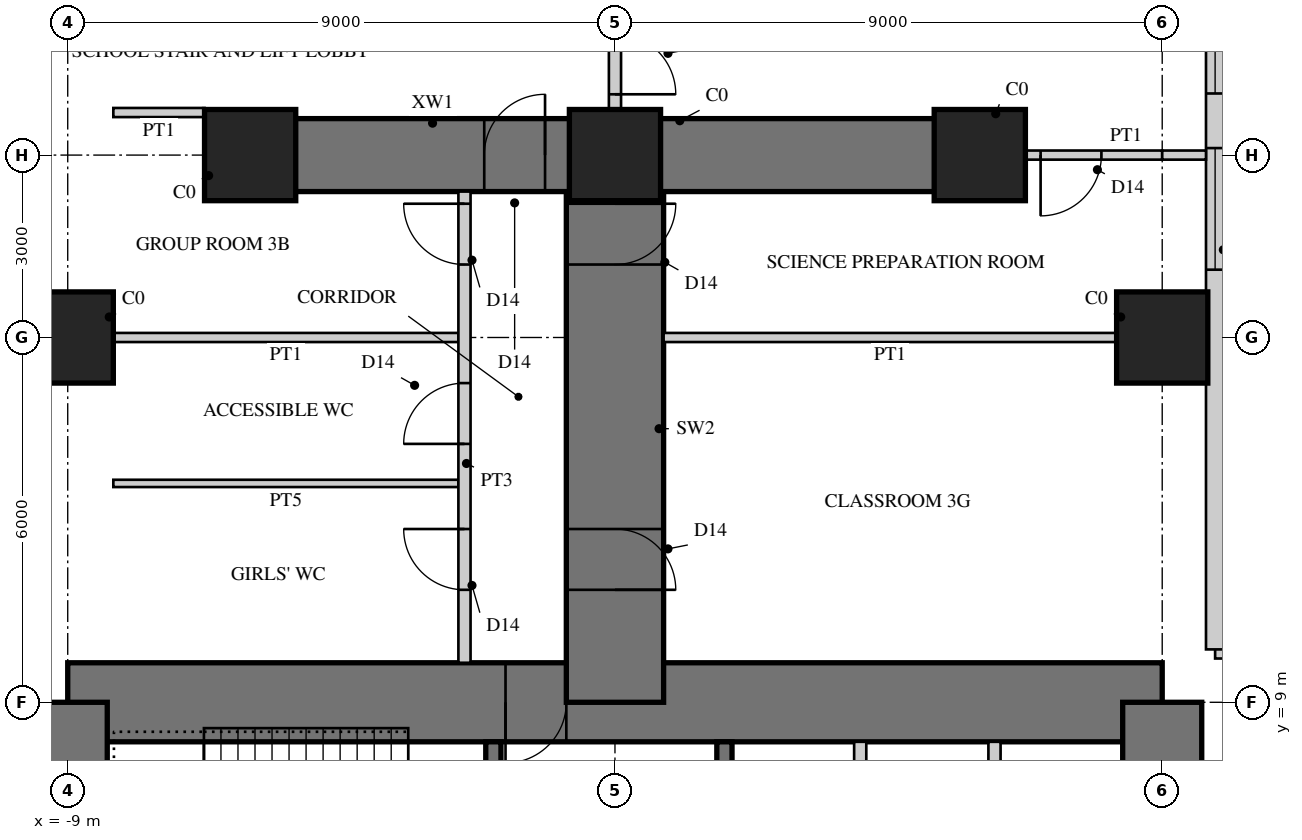
"""IFC4 building model, lengths in metres.
Left out: names, types, materials, properties, quantities, classifications, styles, units other than length and angle.
Written with IfcOpenShell. Run it as: python <this file> out.ifc"""

import sys

from ifc_helpers import new_model, si_unit, direction, frame, frame_2d, origin, origin_2d, place, context, subcontext, project, spatial, rectangle, hollow_rectangle, extrude, element, fill, save


model = new_model("IFC4")
c1 = context("Model", 3, precision=1e-05, world=origin(), true_north=direction((0.0, 1.0)))
c2 = subcontext(c1, "Body", "Model", "MODEL_VIEW")
j1 = project(units=[si_unit("LENGTHUNIT", "METRE"), si_unit("PLANEANGLEUNIT", "RADIAN")], contexts=[c1])
p1 = place(None, origin())
s1 = spatial("IfcSite", under=j1, at=p1, CompositionType="ELEMENT")
p2 = place(p1, origin())
s2 = spatial("IfcBuilding", under=s1, at=p2, CompositionType="ELEMENT")
p3 = place(p2, frame((0.0, 0.0, 14.0)))
s3 = spatial("IfcBuildingStorey", under=s2, at=p3, CompositionType="ELEMENT", Elevation=14.0)
p4 = place(p3, frame((9.0, 9.0, 0.0), z_axis=(0.0, 0.0, 1.0), x_axis=(-1.0, 0.0, 0.0)))
e1 = element("IfcWall", 1, at=p4, inside=s3, PredefinedType="SHEAR", context=c2, shape_type="SweptSolid", body=[
    extrude(rectangle(XDim=18.0, YDim=1.3, at=frame_2d((9.0, 0.0))), origin(), (0.0, 0.0, 1.0), 4.5),
])
p5 = place(p4, frame((9.8, 0.0, 0.0)))
e2 = element("IfcOpeningElement", 2, at=p5, cuts=e1, PredefinedType="OPENING", context=c2, shape_type="SweptSolid", body=[
    extrude(rectangle(XDim=1.0, YDim=2.4, at=frame_2d((0.5, 1.2))), frame((0.0, 0.66, 0.0), z_axis=(0.0, -1.0, 0.0), x_axis=(1.0, 0.0, 0.0)), (0.0, 0.0, 1.0), 1.32),
])
p6 = place(p3, frame((9.0, -9.0, 0.0), z_axis=(0.0, 0.0, 1.0), x_axis=(0.0, 1.0, 0.0)))
e3 = element("IfcWall", 3, at=p6, inside=s3, PredefinedType="SHEAR", context=c2, shape_type="SweptSolid", body=[
    extrude(rectangle(XDim=18.0, YDim=1.3, at=frame_2d((9.0, 0.0))), origin(), (0.0, 0.0, 1.0), 4.5),
])
p7 = place(p6, frame((9.8, 0.0, 0.0)))
e4 = element("IfcOpeningElement", 4, at=p7, cuts=e3, PredefinedType="OPENING", context=c2, shape_type="SweptSolid", body=[
    extrude(rectangle(XDim=1.0, YDim=2.4, at=frame_2d((0.5, 1.2))), frame((0.0, 0.66, 0.0), z_axis=(0.0, -1.0, 0.0), x_axis=(1.0, 0.0, 0.0)), (0.0, 0.0, 1.0), 1.32),
])
p8 = place(p3, frame((-9.0, 9.0, 0.0), z_axis=(0.0, 0.0, 1.0), x_axis=(0.0, -1.0, 0.0)))
e5 = element("IfcWall", 5, at=p8, inside=s3, PredefinedType="SHEAR", context=c2, shape_type="SweptSolid", body=[
    extrude(rectangle(XDim=18.0, YDim=1.3, at=frame_2d((9.0, 0.0))), origin(), (0.0, 0.0, 1.0), 4.5),
])
p9 = place(p8, frame((9.8, 0.0, 0.0)))
e6 = element("IfcOpeningElement", 6, at=p9, cuts=e5, PredefinedType="OPENING", context=c2, shape_type="SweptSolid", body=[
    extrude(rectangle(XDim=1.0, YDim=2.4, at=frame_2d((0.5, 1.2))), frame((0.0, 0.66, 0.0), z_axis=(0.0, -1.0, 0.0), x_axis=(1.0, 0.0, 0.0)), (0.0, 0.0, 1.0), 1.32),
])
p10 = place(p3, frame((1.8, 1.875, 0.0), z_axis=(0.0, 0.0, 1.0), x_axis=(0.0, 1.0, 0.0)))
e7 = element("IfcWall", 7, at=p10, inside=s3, PredefinedType="SHEAR", context=c2, shape_type="SweptSolid", body=[
    extrude(rectangle(XDim=6.475, YDim=0.25, at=frame_2d((3.238, 0.0))), origin(), (0.0, 0.0, 1.0), 4.5),
])
p11 = place(p10, frame((1.875, 0.0, 0.0)))
e8 = element("IfcOpeningElement", 8, at=p11, cuts=e7, PredefinedType="OPENING", context=c2, shape_type="SweptSolid", body=[
    extrude(rectangle(XDim=1.6, YDim=2.4, at=frame_2d((0.8, 1.2))), frame((0.0, 0.135, 0.0), z_axis=(0.0, -1.0, 0.0), x_axis=(1.0, 0.0, 0.0)), (0.0, 0.0, 1.0), 0.27),
])
for number, where, z_axis, x_axis in (
    (9, (4.033, 5.975, 0.0), (0.0, 0.0, 1.0), (0.0, 1.0, 0.0)),
    (10, (6.242, 5.975, 0.0), (0.0, 0.0, 1.0), (0.0, 1.0, 0.0)),
):
    element("IfcWall", number, at=place(p3, frame(where, z_axis=z_axis, x_axis=x_axis)), inside=s3, PredefinedType="PARTITIONING", context=c2, shape_type="SweptSolid", body=[
        extrude(rectangle(XDim=2.375, YDim=0.2, at=frame_2d((1.188, 0.0))), origin(), (0.0, 0.0, 1.0), 4.5),
    ])
p12 = place(p3, frame((-2.0, 1.675, 0.0), z_axis=(0.0, 0.0, 1.0), x_axis=(0.0, 1.0, 0.0)))
e11 = element("IfcWall", 11, at=p12, inside=s3, PredefinedType="SHEAR", context=c2, shape_type="SweptSolid", body=[
    extrude(rectangle(XDim=6.675, YDim=0.25, at=frame_2d((3.337, 0.0))), origin(), (0.0, 0.0, 1.0), 4.5),
])
p13 = place(p12, frame((0.725, 0.0, 0.0)))
e12 = element("IfcOpeningElement", 12, at=p13, cuts=e11, PredefinedType="OPENING", context=c2, shape_type="SweptSolid", body=[
    extrude(rectangle(XDim=1.0, YDim=2.1, at=frame_2d((0.5, 1.05))), frame((0.0, 0.135, 0.0), z_axis=(0.0, -1.0, 0.0), x_axis=(1.0, 0.0, 0.0)), (0.0, 0.0, 1.0), 0.27),
])
p14 = place(p3, frame((0.0, 9.0, 0.0), z_axis=(0.0, 0.0, 1.0), x_axis=(0.0, 1.0, 0.0)))
e13 = element("IfcWall", 13, at=p14, inside=s3, PredefinedType="SHEAR", context=c2, shape_type="SweptSolid", body=[
    extrude(rectangle(XDim=9.0, YDim=1.6, at=frame_2d((4.5, 0.0))), origin(), (0.0, 0.0, 1.0), 4.5),
])
p15 = place(p14, frame((1.85, 0.0, 0.0)))
e14 = element("IfcOpeningElement", 14, at=p15, cuts=e13, PredefinedType="OPENING", context=c2, shape_type="SweptSolid", body=[
    extrude(rectangle(XDim=1.0, YDim=2.2, at=frame_2d((0.5, 1.1))), frame((0.0, 0.81, 0.0), z_axis=(0.0, -1.0, 0.0), x_axis=(1.0, 0.0, 0.0)), (0.0, 0.0, 1.0), 1.62),
])
p16 = place(p14, frame((7.2, 0.0, 0.0)))
e15 = element("IfcOpeningElement", 15, at=p16, cuts=e13, PredefinedType="OPENING", context=c2, shape_type="SweptSolid", body=[
    extrude(rectangle(XDim=1.0, YDim=2.2, at=frame_2d((0.5, 1.1))), frame((0.0, 0.81, 0.0), z_axis=(0.0, -1.0, 0.0), x_axis=(1.0, 0.0, 0.0)), (0.0, 0.0, 1.0), 1.62),
])
p17 = place(p3, frame((0.0, 18.0, 0.0), z_axis=(0.0, 0.0, 1.0), x_axis=(-1.0, 0.0, 0.0)))
e16 = element("IfcWall", 16, at=p17, inside=s3, PredefinedType="SHEAR", context=c2, shape_type="SweptSolid", body=[
    extrude(rectangle(XDim=6.0, YDim=1.2, at=frame_2d((3.0, 0.0))), origin(), (0.0, 0.0, 1.0), 4.5),
])
p18 = place(p17, frame((1.15, 0.0, 0.0)))
e17 = element("IfcOpeningElement", 17, at=p18, cuts=e16, PredefinedType="OPENING", context=c2, shape_type="SweptSolid", body=[
    extrude(rectangle(XDim=1.0, YDim=2.2, at=frame_2d((0.5, 1.1))), frame((0.0, 0.61, 0.0), z_axis=(0.0, -1.0, 0.0), x_axis=(1.0, 0.0, 0.0)), (0.0, 0.0, 1.0), 1.22),
])
p19 = place(p3, frame((0.0, 18.0, 0.0), z_axis=(0.0, 0.0, 1.0), x_axis=(1.0, 0.0, 0.0)))
e18 = element("IfcWall", 18, at=p19, inside=s3, PredefinedType="SHEAR", context=c2, shape_type="SweptSolid", body=[
    extrude(rectangle(XDim=6.0, YDim=1.2, at=frame_2d((3.0, 0.0))), origin(), (0.0, 0.0, 1.0), 4.5),
])
for number, where, z_axis, x_axis in (
    (19, (9.0, 15.0, 0.0), (0.0, 0.0, 1.0), (1.0, 0.0, 0.0)),
    (20, (-9.0, 15.0, 0.0), (0.0, 0.0, 1.0), (1.0, 0.0, 0.0)),
    (21, (6.0, 18.0, 0.0), (0.0, 0.0, 1.0), (1.0, 0.0, 0.0)),
    (22, (0.0, 18.0, 0.0), (0.0, 0.0, 1.0), (1.0, 0.0, 0.0)),
    (23, (-6.0, 18.0, 0.0), (0.0, 0.0, 1.0), (1.0, 0.0, 0.0)),
):
    element("IfcColumn", number, at=place(p3, frame(where, z_axis=z_axis, x_axis=x_axis)), inside=s3, PredefinedType="COLUMN", context=c2, shape_type="SweptSolid", body=[
        extrude(rectangle(XDim=1.5, YDim=1.5, at=origin_2d()), origin(), (0.0, 0.0, 1.0), 4.5),
    ])
p20 = place(p3, frame((24.36, 9.87, 0.0), z_axis=(0.0, 0.0, 1.0), x_axis=(-1.0, 0.0, 0.0)))
e24 = element("IfcWall", 24, at=p20, inside=s3, PredefinedType="SOLIDWALL", context=c2, shape_type="SweptSolid", body=[
    extrude(rectangle(XDim=14.49, YDim=0.3, at=frame_2d((7.245, 0.0))), origin(), (0.0, 0.0, 1.0), 4.25),
])
p21 = place(p20, frame((3.347, 0.0, 0.9)))
e25 = element("IfcOpeningElement", 25, at=p21, cuts=e24, PredefinedType="OPENING", context=c2, shape_type="SweptSolid", body=[
    extrude(rectangle(XDim=2.0, YDim=1.8, at=frame_2d((1.0, 0.9))), frame((0.0, 0.16, 0.0), z_axis=(0.0, -1.0, 0.0), x_axis=(1.0, 0.0, 0.0)), (0.0, 0.0, 1.0), 0.32),
])
p22 = place(p3, frame((9.87, 9.87, 0.0), z_axis=(0.0, 0.0, 1.0), x_axis=(0.0, 1.0, 0.0)))
e26 = element("IfcWall", 26, at=p22, inside=s3, PredefinedType="SOLIDWALL", context=c2, shape_type="SweptSolid", body=[
    extrude(rectangle(XDim=14.49, YDim=0.3, at=frame_2d((7.245, 0.0))), origin(), (0.0, 0.0, 1.0), 4.25),
])
p23 = place(p22, frame((6.245, 0.0, 0.9)))
e27 = element("IfcOpeningElement", 27, at=p23, cuts=e26, PredefinedType="OPENING", context=c2, shape_type="SweptSolid", body=[
    extrude(rectangle(XDim=2.0, YDim=1.8, at=frame_2d((1.0, 0.9))), frame((0.0, 0.16, 0.0), z_axis=(0.0, -1.0, 0.0), x_axis=(1.0, 0.0, 0.0)), (0.0, 0.0, 1.0), 0.32),
])
p24 = place(p22, frame((9.143, 0.0, 0.9)))
e28 = element("IfcOpeningElement", 28, at=p24, cuts=e26, PredefinedType="OPENING", context=c2, shape_type="SweptSolid", body=[
    extrude(rectangle(XDim=2.0, YDim=1.8, at=frame_2d((1.0, 0.9))), frame((0.0, 0.16, 0.0), z_axis=(0.0, -1.0, 0.0), x_axis=(1.0, 0.0, 0.0)), (0.0, 0.0, 1.0), 0.32),
])
p25 = place(p3, frame((-2.575, 15.0, 0.0), z_axis=(0.0, 0.0, 1.0), x_axis=(-1.0, 0.0, 0.0)))
e29 = element("IfcWall", 29, at=p25, inside=s3, PredefinedType="PARTITIONING", context=c2, shape_type="SweptSolid", body=[
    extrude(rectangle(XDim=5.675, YDim=0.15, at=frame_2d((2.837, 0.0))), origin(), (0.0, 0.0, 1.0), 3.2),
])
p26 = place(p3, frame((8.25, 15.0, 0.0), z_axis=(0.0, 0.0, 1.0), x_axis=(-1.0, 0.0, 0.0)))
e30 = element("IfcWall", 30, at=p26, inside=s3, PredefinedType="PARTITIONING", context=c2, shape_type="SweptSolid", body=[
    extrude(rectangle(XDim=7.45, YDim=0.15, at=frame_2d((3.725, 0.0))), origin(), (0.0, 0.0, 1.0), 3.2),
])
p27 = place(p3, frame((-2.575, 12.6, 0.0), z_axis=(0.0, 0.0, 1.0), x_axis=(-1.0, 0.0, 0.0)))
e31 = element("IfcWall", 31, at=p27, inside=s3, PredefinedType="PLUMBINGWALL", context=c2, shape_type="SweptSolid", body=[
    extrude(rectangle(XDim=5.675, YDim=0.12, at=frame_2d((2.837, 0.0))), origin(), (0.0, 0.0, 1.0), 4.25),
])
p28 = place(p3, frame((-2.475, 9.65, 0.0), z_axis=(0.0, 0.0, 1.0), x_axis=(0.0, 1.0, 0.0)))
e32 = element("IfcWall", 32, at=p28, inside=s3, PredefinedType="SOLIDWALL", context=c2, shape_type="SweptSolid", body=[
    extrude(rectangle(XDim=7.75, YDim=0.2, at=frame_2d((3.875, 0.0))), origin(), (0.0, 0.0, 1.0), 4.25),
])
p29 = place(p28, frame((1.2, 0.0, 0.0)))
e33 = element("IfcOpeningElement", 33, at=p29, cuts=e32, PredefinedType="OPENING", context=c2, shape_type="SweptSolid", body=[
    extrude(rectangle(XDim=1.0, YDim=2.2, at=frame_2d((0.5, 1.1))), frame((0.0, 0.11, 0.0), z_axis=(0.0, -1.0, 0.0), x_axis=(1.0, 0.0, 0.0)), (0.0, 0.0, 1.0), 0.22),
])
p30 = place(p28, frame((3.6, 0.0, 0.0)))
e34 = element("IfcOpeningElement", 34, at=p30, cuts=e32, PredefinedType="OPENING", context=c2, shape_type="SweptSolid", body=[
    extrude(rectangle(XDim=1.0, YDim=2.2, at=frame_2d((0.5, 1.1))), frame((0.0, 0.11, 0.0), z_axis=(0.0, -1.0, 0.0), x_axis=(1.0, 0.0, 0.0)), (0.0, 0.0, 1.0), 0.22),
])
p31 = place(p28, frame((6.55, 0.0, 0.0)))
e35 = element("IfcOpeningElement", 35, at=p31, cuts=e32, PredefinedType="OPENING", context=c2, shape_type="SweptSolid", body=[
    extrude(rectangle(XDim=1.0, YDim=2.2, at=frame_2d((0.5, 1.1))), frame((0.0, 0.11, 0.0), z_axis=(0.0, -1.0, 0.0), x_axis=(1.0, 0.0, 0.0)), (0.0, 0.0, 1.0), 0.22),
])
p32 = place(p3, frame((-6.75, 18.7, 0.0), z_axis=(0.0, 0.0, 1.0), x_axis=(-1.0, 0.0, 0.0)))
e36 = element("IfcWall", 36, at=p32, inside=s3, PredefinedType="PARTITIONING", context=c2, shape_type="SweptSolid", body=[
    extrude(rectangle(XDim=1.5, YDim=0.15, at=frame_2d((0.75, 0.0))), origin(), (0.0, 0.0, 1.0), 4.25),
])
p33 = place(p3, frame((6.75, 18.0, 0.0), z_axis=(0.0, 0.0, 1.0), x_axis=(1.0, 0.0, 0.0)))
e37 = element("IfcWall", 37, at=p33, inside=s3, PredefinedType="PARTITIONING", context=c2, shape_type="SweptSolid", body=[
    extrude(rectangle(XDim=2.25, YDim=0.15, at=frame_2d((1.125, 0.0))), origin(), (0.0, 0.0, 1.0), 3.2),
])
p34 = place(p33, frame((0.25, 0.0, 0.0)))
e38 = element("IfcOpeningElement", 38, at=p34, cuts=e37, PredefinedType="OPENING", context=c2, shape_type="SweptSolid", body=[
    extrude(rectangle(XDim=1.0, YDim=2.2, at=frame_2d((0.5, 1.1))), frame((0.0, 0.085, 0.0), z_axis=(0.0, -1.0, 0.0), x_axis=(1.0, 0.0, 0.0)), (0.0, 0.0, 1.0), 0.17),
])
p35 = place(p3, frame((9.0, 18.0, 0.0), z_axis=(0.0, 0.0, 1.0), x_axis=(1.0, 0.0, 0.0)))
e39 = element("IfcWall", 39, at=p35, inside=s3, PredefinedType="PARTITIONING", context=c2, shape_type="SweptSolid", body=[
    extrude(rectangle(XDim=0.72, YDim=0.15, at=frame_2d((0.36, 0.0))), origin(), (0.0, 0.0, 1.0), 4.25),
])
p36 = place(p3, frame((0.0, 18.0, 0.0), z_axis=(0.0, 0.0, 1.0), x_axis=(0.0, 1.0, 0.0)))
e40 = element("IfcWall", 40, at=p36, inside=s3, PredefinedType="SOLIDWALL", context=c2, shape_type="SweptSolid", body=[
    extrude(rectangle(XDim=3.0, YDim=0.2, at=frame_2d((1.5, 0.0))), origin(), (0.0, 0.0, 1.0), 4.25),
])
p37 = place(p36, frame((1.0, 0.0, 0.0)))
e41 = element("IfcOpeningElement", 41, at=p37, cuts=e40, PredefinedType="OPENING", context=c2, shape_type="SweptSolid", body=[
    extrude(rectangle(XDim=1.0, YDim=2.2, at=frame_2d((0.5, 1.1))), frame((0.0, 0.11, 0.0), z_axis=(0.0, -1.0, 0.0), x_axis=(1.0, 0.0, 0.0)), (0.0, 0.0, 1.0), 0.22),
])
p38 = place(p23, origin())
e42 = element("IfcWindow", 42, at=p38, inside=s3, PartitioningType="SINGLE_PANEL", PredefinedType="WINDOW", context=c2, shape_type="SweptSolid", body=[
    extrude(hollow_rectangle(XDim=2.0, YDim=1.8, WallThickness=0.06, at=frame_2d((1.0, 0.9))), frame((0.0, 0.03, 0.0), z_axis=(0.0, -1.0, 0.0), x_axis=(1.0, 0.0, 0.0)), (0.0, 0.0, 1.0), 0.06),
    extrude(rectangle(XDim=1.879, YDim=1.679, at=frame_2d((1.0, 0.9))), frame((0.0, 0.03, 0.0), z_axis=(0.0, -1.0, 0.0), x_axis=(1.0, 0.0, 0.0)), (0.0, 0.0, 1.0), 0.06),
])
fill(e27, e42)
p39 = place(p24, origin())
e43 = element("IfcWindow", 43, at=p39, inside=s3, PartitioningType="SINGLE_PANEL", PredefinedType="WINDOW", context=c2, shape_type="SweptSolid", body=[
    extrude(hollow_rectangle(XDim=2.0, YDim=1.8, WallThickness=0.06, at=frame_2d((1.0, 0.9))), frame((0.0, 0.03, 0.0), z_axis=(0.0, -1.0, 0.0), x_axis=(1.0, 0.0, 0.0)), (0.0, 0.0, 1.0), 0.06),
    extrude(rectangle(XDim=1.879, YDim=1.679, at=frame_2d((1.0, 0.9))), frame((0.0, 0.03, 0.0), z_axis=(0.0, -1.0, 0.0), x_axis=(1.0, 0.0, 0.0)), (0.0, 0.0, 1.0), 0.06),
])
fill(e28, e43)
p40 = place(p29, origin())
e44 = element("IfcDoor", 44, at=p40, inside=s3, OperationType="SINGLE_SWING_RIGHT", PredefinedType="DOOR", context=c2, shape_type="SweptSolid", body=[
    extrude(rectangle(XDim=1.0, YDim=2.2, at=frame_2d((0.5, 1.1))), frame((0.0, 0.025, 0.0), z_axis=(0.0, -1.0, 0.0), x_axis=(1.0, 0.0, 0.0)), (0.0, 0.0, 1.0), 0.05),
])
fill(e33, e44)
p41 = place(p30, origin())
e45 = element("IfcDoor", 45, at=p41, inside=s3, OperationType="SINGLE_SWING_LEFT", PredefinedType="DOOR", context=c2, shape_type="SweptSolid", body=[
    extrude(rectangle(XDim=1.0, YDim=2.2, at=frame_2d((0.5, 1.1))), frame((0.0, 0.025, 0.0), z_axis=(0.0, -1.0, 0.0), x_axis=(1.0, 0.0, 0.0)), (0.0, 0.0, 1.0), 0.05),
])
fill(e34, e45)
p42 = place(p31, origin())
e46 = element("IfcDoor", 46, at=p42, inside=s3, OperationType="SINGLE_SWING_RIGHT", PredefinedType="DOOR", context=c2, shape_type="SweptSolid", body=[
    extrude(rectangle(XDim=1.0, YDim=2.2, at=frame_2d((0.5, 1.1))), frame((0.0, 0.025, 0.0), z_axis=(0.0, -1.0, 0.0), x_axis=(1.0, 0.0, 0.0)), (0.0, 0.0, 1.0), 0.05),
])
fill(e35, e46)
p43 = place(p34, frame((1.0, 0.0, 0.0), z_axis=(0.0, 0.0, 1.0), x_axis=(-1.0, 0.0, 0.0)))
e47 = element("IfcDoor", 47, at=p43, inside=s3, OperationType="SINGLE_SWING_RIGHT", PredefinedType="DOOR", context=c2, shape_type="SweptSolid", body=[
    extrude(rectangle(XDim=1.0, YDim=2.2, at=frame_2d((0.5, 1.1))), frame((0.0, 0.025, 0.0), z_axis=(0.0, -1.0, 0.0), x_axis=(1.0, 0.0, 0.0)), (0.0, 0.0, 1.0), 0.05),
])
fill(e38, e47)
p44 = place(p15, frame((1.0, 0.0, 0.0), z_axis=(0.0, 0.0, 1.0), x_axis=(-1.0, 0.0, 0.0)))
e48 = element("IfcDoor", 48, at=p44, inside=s3, OperationType="SINGLE_SWING_RIGHT", PredefinedType="DOOR", context=c2, shape_type="SweptSolid", body=[
    extrude(rectangle(XDim=1.0, YDim=2.2, at=frame_2d((0.5, 1.1))), frame((0.0, 0.025, 0.0), z_axis=(0.0, -1.0, 0.0), x_axis=(1.0, 0.0, 0.0)), (0.0, 0.0, 1.0), 0.05),
])
fill(e14, e48)
p45 = place(p16, frame((1.0, 0.0, 0.0), z_axis=(0.0, 0.0, 1.0), x_axis=(-1.0, 0.0, 0.0)))
e49 = element("IfcDoor", 49, at=p45, inside=s3, OperationType="SINGLE_SWING_LEFT", PredefinedType="DOOR", context=c2, shape_type="SweptSolid", body=[
    extrude(rectangle(XDim=1.0, YDim=2.2, at=frame_2d((0.5, 1.1))), frame((0.0, 0.025, 0.0), z_axis=(0.0, -1.0, 0.0), x_axis=(1.0, 0.0, 0.0)), (0.0, 0.0, 1.0), 0.05),
])
fill(e15, e49)
p46 = place(p37, frame((1.0, 0.0, 0.0), z_axis=(0.0, 0.0, 1.0), x_axis=(-1.0, 0.0, 0.0)))
e50 = element("IfcDoor", 50, at=p46, inside=s3, OperationType="SINGLE_SWING_RIGHT", PredefinedType="DOOR", context=c2, shape_type="SweptSolid", body=[
    extrude(rectangle(XDim=1.0, YDim=2.2, at=frame_2d((0.5, 1.1))), frame((0.0, 0.025, 0.0), z_axis=(0.0, -1.0, 0.0), x_axis=(1.0, 0.0, 0.0)), (0.0, 0.0, 1.0), 0.05),
])
fill(e41, e50)
p47 = place(p18, frame((1.0, 0.0, 0.0), z_axis=(0.0, 0.0, 1.0), x_axis=(-1.0, 0.0, 0.0)))
e51 = element("IfcDoor", 51, at=p47, inside=s3, OperationType="SINGLE_SWING_RIGHT", PredefinedType="DOOR", context=c2, shape_type="SweptSolid", body=[
    extrude(rectangle(XDim=1.0, YDim=2.2, at=frame_2d((0.5, 1.1))), frame((0.0, 0.025, 0.0), z_axis=(0.0, -1.0, 0.0), x_axis=(1.0, 0.0, 0.0)), (0.0, 0.0, 1.0), 0.05),
])
fill(e17, e51)
p48 = place(p5, origin())
e52 = element("IfcDoor", 52, at=p48, inside=s3, OperationType="SINGLE_SWING_RIGHT", PredefinedType="DOOR", context=c2, shape_type="SweptSolid", body=[
    extrude(rectangle(XDim=1.0, YDim=2.4, at=frame_2d((0.5, 1.2))), frame((0.0, 0.055, 0.0), z_axis=(0.0, -1.0, 0.0), x_axis=(1.0, 0.0, 0.0)), (0.0, 0.0, 1.0), 0.05),
])
fill(e2, e52)
save(model, sys.argv[1])
